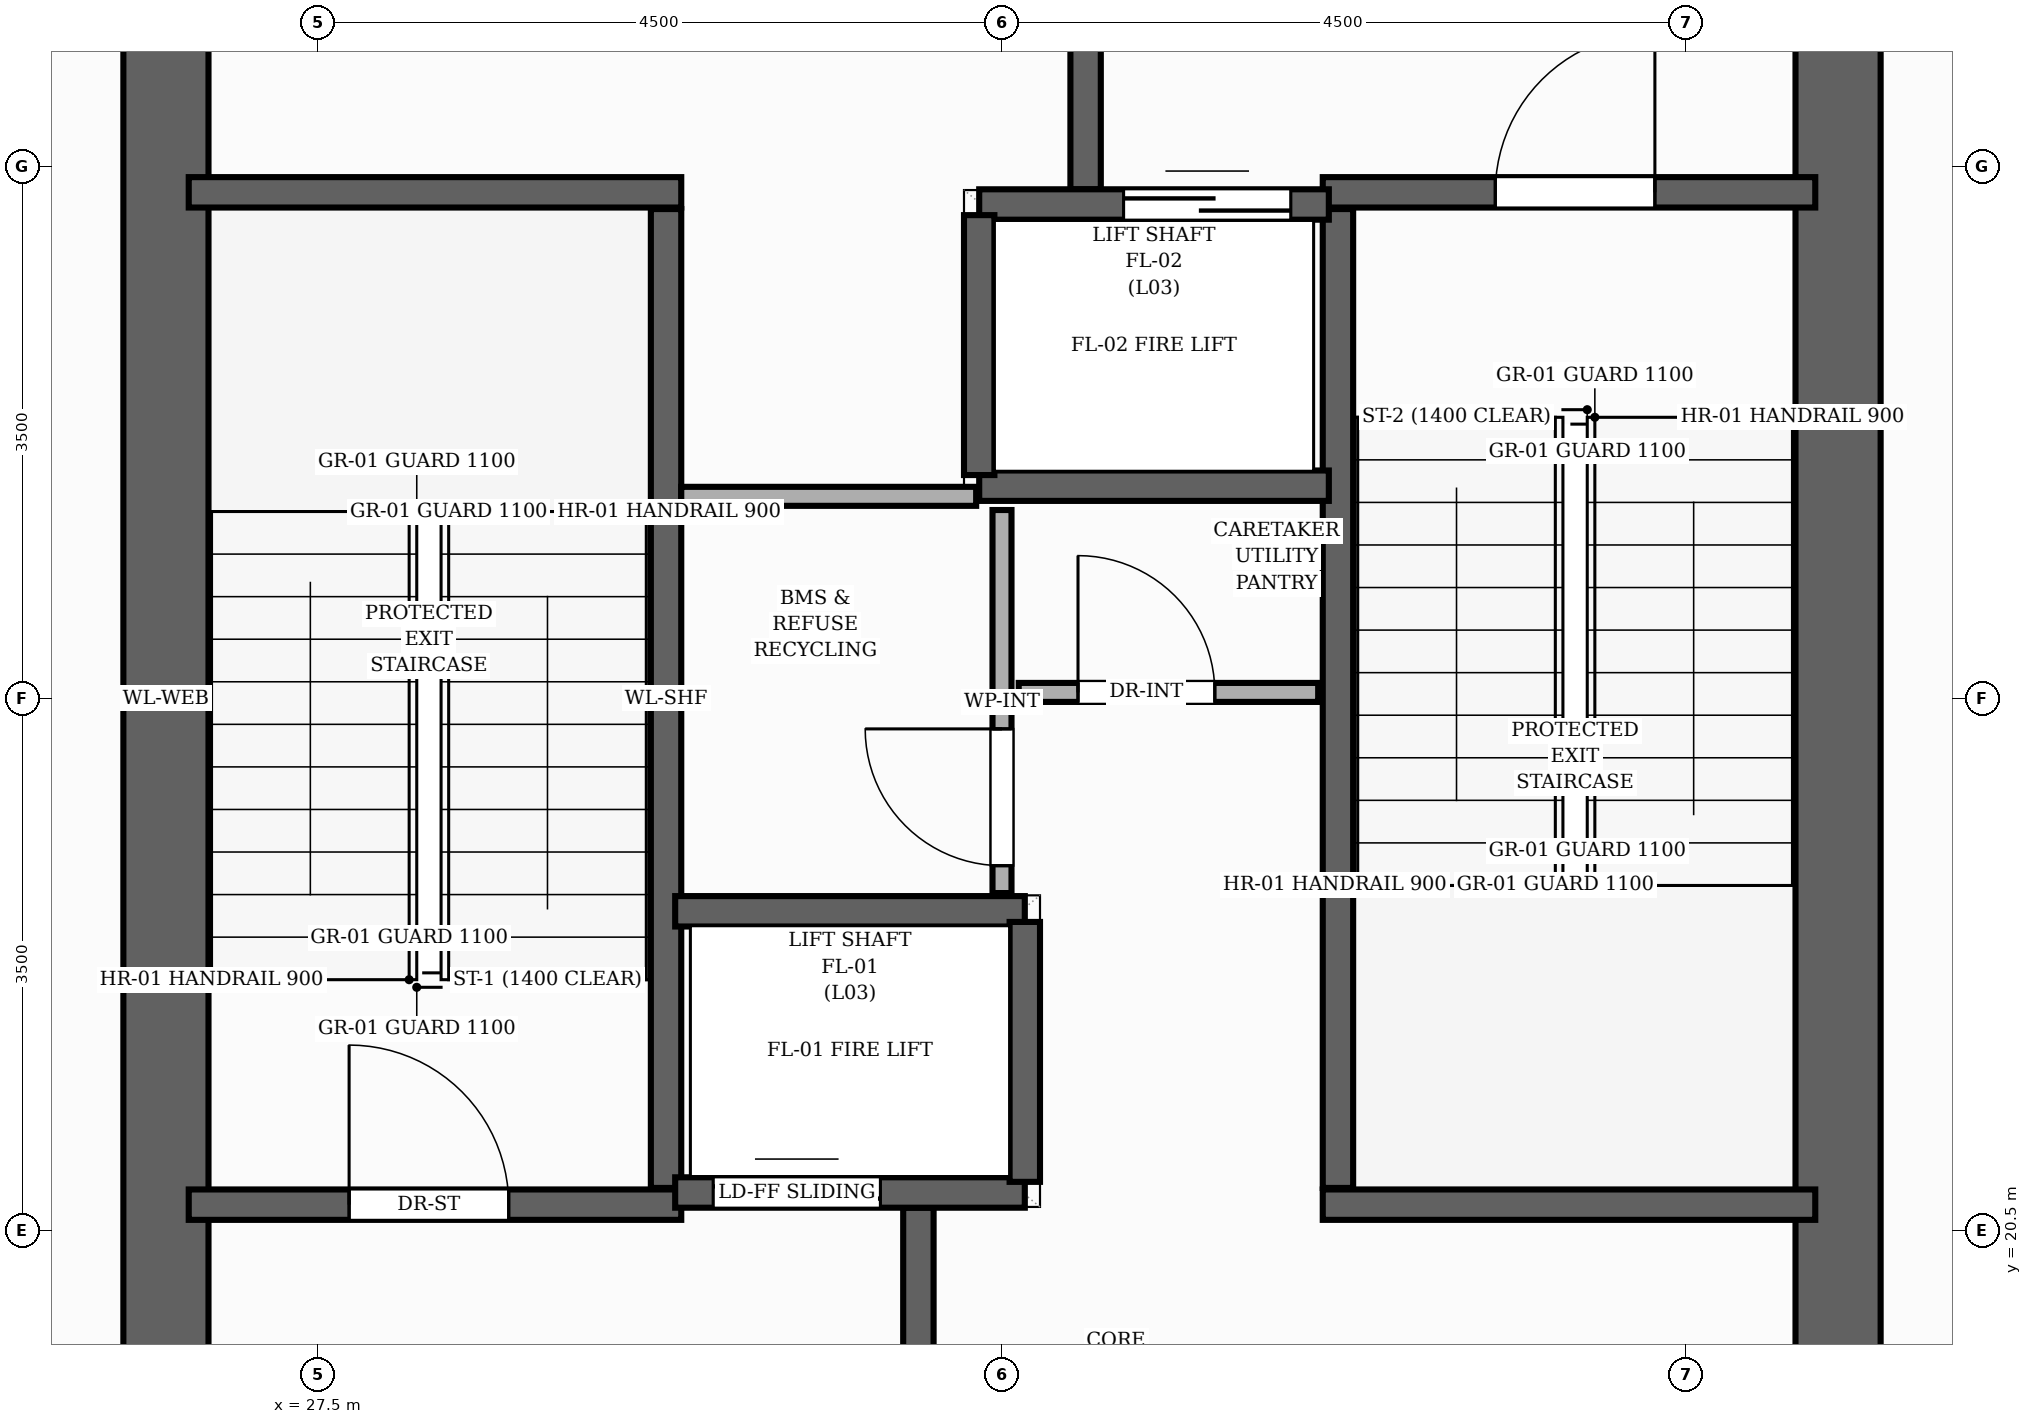
"""IFC4 building model, lengths in metres.
Left out: names, types, materials, properties, quantities, classifications, styles, units other than length and angle.
Written with IfcOpenShell. Run it as: python <this file> out.ifc"""

import sys

from ifc_helpers import new_model, si_unit, direction, frame, frame_2d, origin, place, context, subcontext, project, spatial, rectangle, extrude, element, fill, save


model = new_model("IFC4")
c1 = context("Model", 3, precision=1e-05, world=origin(), true_north=direction((0.0, 1.0)))
c2 = subcontext(c1, "Body", "Model", "MODEL_VIEW")
j1 = project(units=[si_unit("LENGTHUNIT", "METRE"), si_unit("PLANEANGLEUNIT", "RADIAN")], contexts=[c1])
p1 = place(None, origin())
s1 = spatial("IfcSite", under=j1, at=p1, CompositionType="ELEMENT")
p2 = place(p1, origin())
s2 = spatial("IfcBuilding", under=s1, at=p2, CompositionType="ELEMENT")
p3 = place(p2, frame((0.0, 0.0, 8.0)))
s3 = spatial("IfcBuildingStorey", under=s2, at=p3, CompositionType="ELEMENT", Elevation=8.0)
for number, where, z_axis, x_axis in (
    (1, (26.5, 17.4, 0.0), (0.0, 0.0, 1.0), (0.0, 1.0, 0.0)),
    (2, (37.5, 17.4, 0.0), (0.0, 0.0, 1.0), (0.0, 1.0, 0.0)),
):
    element("IfcWall", number, at=place(p3, frame(where, z_axis=z_axis, x_axis=x_axis)), inside=s3, PredefinedType="SHEAR", context=c2, shape_type="SweptSolid", body=[
        extrude(rectangle(XDim=13.2, YDim=0.56, at=frame_2d((6.6, 0.0))), origin(), (0.0, 0.0, 1.0), 4.0),
    ])
p4 = place(p3, frame((29.79, 20.78, 0.0), z_axis=(0.0, 0.0, 1.0), x_axis=(0.0, 1.0, 0.0)))
e3 = element("IfcWall", 3, at=p4, inside=s3, PredefinedType="SHEAR", context=c2, shape_type="SweptSolid", body=[
    extrude(rectangle(XDim=6.44, YDim=0.2, at=frame_2d((3.22, 0.0))), origin(), (0.0, 0.0, 1.0), 4.0),
])
p5 = place(p3, frame((26.65, 27.33, 0.0), z_axis=(0.0, 0.0, 1.0), x_axis=(1.0, 0.0, 0.0)))
e4 = element("IfcWall", 4, at=p5, inside=s3, PredefinedType="SHEAR", context=c2, shape_type="SweptSolid", body=[
    extrude(rectangle(XDim=3.24, YDim=0.2, at=frame_2d((1.62, 0.0))), origin(), (0.0, 0.0, 1.0), 4.0),
])
p6 = place(p3, frame((26.65, 20.67, 0.0), z_axis=(0.0, 0.0, 1.0), x_axis=(1.0, 0.0, 0.0)))
e5 = element("IfcWall", 5, at=p6, inside=s3, PredefinedType="SHEAR", context=c2, shape_type="SweptSolid", body=[
    extrude(rectangle(XDim=3.24, YDim=0.2, at=frame_2d((1.62, 0.0))), origin(), (0.0, 0.0, 1.0), 4.0),
])
p7 = place(p6, frame((1.055, 0.0, 0.0)))
e6 = element("IfcOpeningElement", 6, at=p7, cuts=e5, PredefinedType="OPENING", context=c2, shape_type="SweptSolid", body=[
    extrude(rectangle(XDim=1.05, YDim=2.15, at=frame_2d((0.525, 1.075))), frame((0.0, 0.11, 0.0), z_axis=(0.0, -1.0, 0.0), x_axis=(1.0, 0.0, 0.0)), (0.0, 0.0, 1.0), 0.22),
])
p8 = place(p3, frame((34.21, 20.78, 0.0), z_axis=(0.0, 0.0, 1.0), x_axis=(0.0, 1.0, 0.0)))
e7 = element("IfcWall", 7, at=p8, inside=s3, PredefinedType="SHEAR", context=c2, shape_type="SweptSolid", body=[
    extrude(rectangle(XDim=6.44, YDim=0.2, at=frame_2d((3.22, 0.0))), origin(), (0.0, 0.0, 1.0), 4.0),
])
p9 = place(p3, frame((34.11, 20.67, 0.0), z_axis=(0.0, 0.0, 1.0), x_axis=(1.0, 0.0, 0.0)))
e8 = element("IfcWall", 8, at=p9, inside=s3, PredefinedType="SHEAR", context=c2, shape_type="SweptSolid", body=[
    extrude(rectangle(XDim=3.24, YDim=0.2, at=frame_2d((1.62, 0.0))), origin(), (0.0, 0.0, 1.0), 4.0),
])
p10 = place(p3, frame((34.11, 27.33, 0.0), z_axis=(0.0, 0.0, 1.0), x_axis=(1.0, 0.0, 0.0)))
e9 = element("IfcWall", 9, at=p10, inside=s3, PredefinedType="SHEAR", context=c2, shape_type="SweptSolid", body=[
    extrude(rectangle(XDim=3.24, YDim=0.2, at=frame_2d((1.62, 0.0))), origin(), (0.0, 0.0, 1.0), 4.0),
])
p11 = place(p10, frame((1.135, 0.0, 0.0)))
e10 = element("IfcOpeningElement", 10, at=p11, cuts=e9, PredefinedType="OPENING", context=c2, shape_type="SweptSolid", body=[
    extrude(rectangle(XDim=1.05, YDim=2.15, at=frame_2d((0.525, 1.075))), frame((0.0, 0.11, 0.0), z_axis=(0.0, -1.0, 0.0), x_axis=(1.0, 0.0, 0.0)), (0.0, 0.0, 1.0), 0.22),
])
for number, where, z_axis, x_axis in (
    (11, (31.45, 17.15, 0.0), (0.0, 0.0, 1.0), (0.0, 1.0, 0.0)),
    (12, (32.55, 27.35, 0.0), (0.0, 0.0, 1.0), (0.0, 1.0, 0.0)),
):
    element("IfcWall", number, at=place(p3, frame(where, z_axis=z_axis, x_axis=x_axis)), inside=s3, PredefinedType="SHEAR", context=c2, shape_type="SweptSolid", body=[
        extrude(rectangle(XDim=3.5, YDim=0.2, at=frame_2d((1.75, 0.0))), origin(), (0.0, 0.0, 1.0), 4.0),
    ])
p12 = place(p3, frame((29.85, 20.75, 0.0), z_axis=(0.0, 0.0, 1.0), x_axis=(1.0, 0.0, 0.0)))
e13 = element("IfcWall", 13, at=p12, inside=s3, PredefinedType="SHEAR", context=c2, shape_type="SweptSolid", body=[
    extrude(rectangle(XDim=2.3, YDim=0.2, at=frame_2d((1.15, 0.0))), origin(), (0.0, 0.0, 1.0), 4.0),
])
p13 = place(p12, frame((0.25, 0.0, 0.0)))
e14 = element("IfcOpeningElement", 14, at=p13, cuts=e13, PredefinedType="OPENING", context=c2, shape_type="SweptSolid", body=[
    extrude(rectangle(XDim=1.1, YDim=2.15, at=frame_2d((0.55, 1.075))), frame((0.0, 0.11, 0.0), z_axis=(0.0, -1.0, 0.0), x_axis=(1.0, 0.0, 0.0)), (0.0, 0.0, 1.0), 0.22),
])
p14 = place(p3, frame((29.85, 22.6, 0.0), z_axis=(0.0, 0.0, 1.0), x_axis=(1.0, 0.0, 0.0)))
e15 = element("IfcWall", 15, at=p14, inside=s3, PredefinedType="SHEAR", context=c2, shape_type="SweptSolid", body=[
    extrude(rectangle(XDim=2.3, YDim=0.2, at=frame_2d((1.15, 0.0))), origin(), (0.0, 0.0, 1.0), 4.0),
])
p15 = place(p3, frame((32.15, 20.82, 0.0), z_axis=(0.0, 0.0, 1.0), x_axis=(0.0, 1.0, 0.0)))
e16 = element("IfcWall", 16, at=p15, inside=s3, PredefinedType="SHEAR", context=c2, shape_type="SweptSolid", body=[
    extrude(rectangle(XDim=1.71, YDim=0.2, at=frame_2d((0.855, 0.0))), origin(), (0.0, 0.0, 1.0), 4.0),
])
p16 = place(p3, frame((31.85, 27.25, 0.0), z_axis=(0.0, 0.0, 1.0), x_axis=(1.0, 0.0, 0.0)))
e17 = element("IfcWall", 17, at=p16, inside=s3, PredefinedType="SHEAR", context=c2, shape_type="SweptSolid", body=[
    extrude(rectangle(XDim=2.3, YDim=0.2, at=frame_2d((1.15, 0.0))), origin(), (0.0, 0.0, 1.0), 4.0),
])
p17 = place(p16, frame((0.95, 0.0, 0.0)))
e18 = element("IfcOpeningElement", 18, at=p17, cuts=e17, PredefinedType="OPENING", context=c2, shape_type="SweptSolid", body=[
    extrude(rectangle(XDim=1.1, YDim=2.15, at=frame_2d((0.55, 1.075))), frame((0.0, 0.11, 0.0), z_axis=(0.0, -1.0, 0.0), x_axis=(1.0, 0.0, 0.0)), (0.0, 0.0, 1.0), 0.22),
])
p18 = place(p3, frame((31.85, 25.4, 0.0), z_axis=(0.0, 0.0, 1.0), x_axis=(1.0, 0.0, 0.0)))
e19 = element("IfcWall", 19, at=p18, inside=s3, PredefinedType="SHEAR", context=c2, shape_type="SweptSolid", body=[
    extrude(rectangle(XDim=2.3, YDim=0.2, at=frame_2d((1.15, 0.0))), origin(), (0.0, 0.0, 1.0), 4.0),
])
p19 = place(p3, frame((31.85, 25.47, 0.0), z_axis=(0.0, 0.0, 1.0), x_axis=(0.0, 1.0, 0.0)))
e20 = element("IfcWall", 20, at=p19, inside=s3, PredefinedType="SHEAR", context=c2, shape_type="SweptSolid", body=[
    extrude(rectangle(XDim=1.71, YDim=0.2, at=frame_2d((0.855, 0.0))), origin(), (0.0, 0.0, 1.0), 4.0),
])
p20 = place(p3, frame((32.0, 22.72, 0.0), z_axis=(0.0, 0.0, 1.0), x_axis=(0.0, 1.0, 0.0)))
e21 = element("IfcWall", 21, at=p20, inside=s3, PredefinedType="PARTITIONING", context=c2, shape_type="SweptSolid", body=[
    extrude(rectangle(XDim=2.52, YDim=0.125, at=frame_2d((1.26, 0.0))), origin(), (0.0, 0.0, 1.0), 3.715),
])
p21 = place(p20, frame((0.18, 0.0, 0.0)))
e22 = element("IfcOpeningElement", 22, at=p21, cuts=e21, PredefinedType="OPENING", context=c2, shape_type="SweptSolid", body=[
    extrude(rectangle(XDim=0.9, YDim=2.1, at=frame_2d((0.45, 1.05))), frame((0.0, 0.073, 0.0), z_axis=(0.0, -1.0, 0.0), x_axis=(1.0, 0.0, 0.0)), (0.0, 0.0, 1.0), 0.145),
])
p22 = place(p3, frame((32.11, 24.04, 0.0), z_axis=(0.0, 0.0, 1.0), x_axis=(1.0, 0.0, 0.0)))
e23 = element("IfcWall", 23, at=p22, inside=s3, PredefinedType="PARTITIONING", context=c2, shape_type="SweptSolid", body=[
    extrude(rectangle(XDim=1.97, YDim=0.125, at=frame_2d((0.985, 0.0))), origin(), (0.0, 0.0, 1.0), 3.715),
])
p23 = place(p22, frame((0.39, 0.0, 0.0)))
e24 = element("IfcOpeningElement", 24, at=p23, cuts=e23, PredefinedType="OPENING", context=c2, shape_type="SweptSolid", body=[
    extrude(rectangle(XDim=0.9, YDim=2.1, at=frame_2d((0.45, 1.05))), frame((0.0, 0.073, 0.0), z_axis=(0.0, -1.0, 0.0), x_axis=(1.0, 0.0, 0.0)), (0.0, 0.0, 1.0), 0.145),
])
p24 = place(p3, frame((29.89, 25.33, 0.0), z_axis=(0.0, 0.0, 1.0), x_axis=(1.0, 0.0, 0.0)))
e25 = element("IfcWall", 25, at=p24, inside=s3, PredefinedType="PARTITIONING", context=c2, shape_type="SweptSolid", body=[
    extrude(rectangle(XDim=1.94, YDim=0.125, at=frame_2d((0.97, 0.0))), origin(), (0.0, 0.0, 1.0), 3.715),
])
p25 = place(p7, origin())
e26 = element("IfcDoor", 26, at=p25, inside=s3, OperationType="SINGLE_SWING_LEFT", PredefinedType="DOOR", context=c2, shape_type="SweptSolid", body=[
    extrude(rectangle(XDim=1.05, YDim=2.15, at=frame_2d((0.525, 1.075))), frame((0.0, 0.025, 0.0), z_axis=(0.0, -1.0, 0.0), x_axis=(1.0, 0.0, 0.0)), (0.0, 0.0, 1.0), 0.05),
])
fill(e6, e26)
p26 = place(p11, origin())
e27 = element("IfcDoor", 27, at=p26, inside=s3, OperationType="SINGLE_SWING_RIGHT", PredefinedType="DOOR", context=c2, shape_type="SweptSolid", body=[
    extrude(rectangle(XDim=1.05, YDim=2.15, at=frame_2d((0.525, 1.075))), frame((0.0, 0.025, 0.0), z_axis=(0.0, -1.0, 0.0), x_axis=(1.0, 0.0, 0.0)), (0.0, 0.0, 1.0), 0.05),
])
fill(e10, e27)
p27 = place(p13, origin())
e28 = element("IfcDoor", 28, at=p27, inside=s3, OperationType="DOUBLE_DOOR_SLIDING", PredefinedType="DOOR", context=c2, shape_type="SweptSolid", body=[
    extrude(rectangle(XDim=1.1, YDim=2.15, at=frame_2d((0.55, 1.075))), frame((0.0, 0.025, 0.0), z_axis=(0.0, -1.0, 0.0), x_axis=(1.0, 0.0, 0.0)), (0.0, 0.0, 1.0), 0.05),
])
fill(e14, e28)
p28 = place(p17, origin())
e29 = element("IfcDoor", 29, at=p28, inside=s3, OperationType="DOUBLE_DOOR_SLIDING", PredefinedType="DOOR", context=c2, shape_type="SweptSolid", body=[
    extrude(rectangle(XDim=1.1, YDim=2.15, at=frame_2d((0.55, 1.075))), frame((0.0, 0.025, 0.0), z_axis=(0.0, -1.0, 0.0), x_axis=(1.0, 0.0, 0.0)), (0.0, 0.0, 1.0), 0.05),
])
fill(e18, e29)
p29 = place(p23, origin())
e30 = element("IfcDoor", 30, at=p29, inside=s3, OperationType="SINGLE_SWING_LEFT", PredefinedType="DOOR", context=c2, shape_type="SweptSolid", body=[
    extrude(rectangle(XDim=0.9, YDim=2.1, at=frame_2d((0.45, 1.05))), frame((0.0, 0.025, 0.0), z_axis=(0.0, -1.0, 0.0), x_axis=(1.0, 0.0, 0.0)), (0.0, 0.0, 1.0), 0.05),
])
fill(e24, e30)
p30 = place(p21, origin())
e31 = element("IfcDoor", 31, at=p30, inside=s3, OperationType="SINGLE_SWING_RIGHT", PredefinedType="DOOR", context=c2, shape_type="SweptSolid", body=[
    extrude(rectangle(XDim=0.9, YDim=2.1, at=frame_2d((0.45, 1.05))), frame((0.0, 0.025, 0.0), z_axis=(0.0, -1.0, 0.0), x_axis=(1.0, 0.0, 0.0)), (0.0, 0.0, 1.0), 0.05),
])
fill(e22, e31)
save(model, sys.argv[1])
